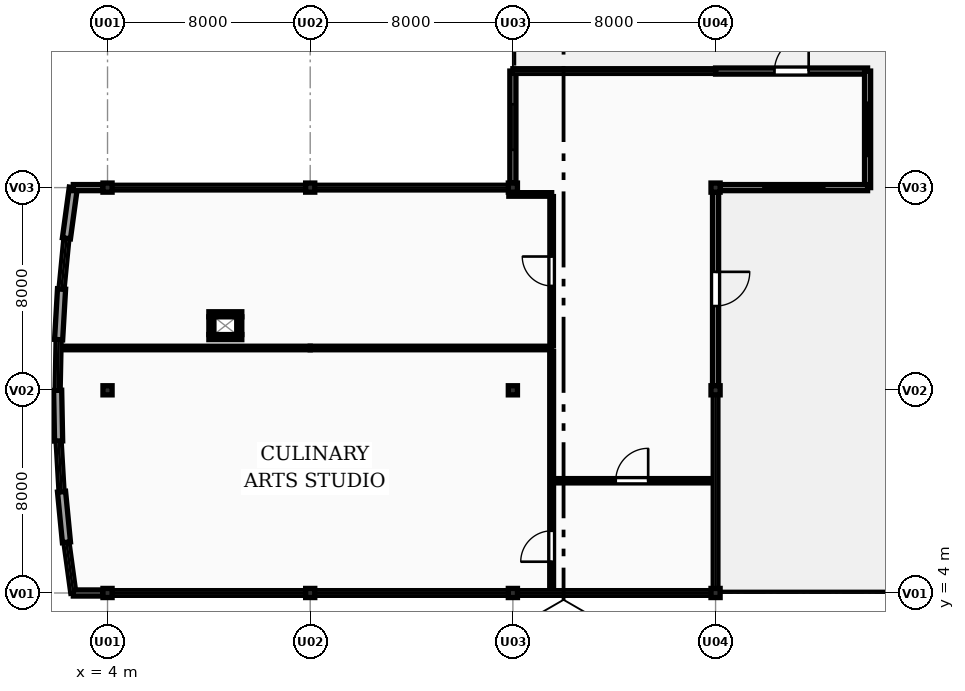
"""IFC4 building model, lengths in metres.
Left out: names, types, materials, properties, quantities, classifications, styles, units other than length and angle.
Written with IfcOpenShell. Run it as: python <this file> out.ifc"""

import sys

from ifc_helpers import new_model, si_unit, direction, frame, frame_2d, origin, origin_2d, place, context, subcontext, project, spatial, rectangle, extrude, element, fill, save


model = new_model("IFC4")
c1 = context("Model", 3, precision=1e-05, world=origin(), true_north=direction((0.0, 1.0)))
c2 = subcontext(c1, "Body", "Model", "MODEL_VIEW")
j1 = project(units=[si_unit("LENGTHUNIT", "METRE"), si_unit("PLANEANGLEUNIT", "RADIAN")], contexts=[c1])
p1 = place(None, origin())
s1 = spatial("IfcSite", under=j1, at=p1, CompositionType="ELEMENT")
p2 = place(p1, origin())
s2 = spatial("IfcBuilding", under=s1, at=p2, CompositionType="ELEMENT")
p3 = place(p2, frame((0.0, 0.0, 8.4)))
s3 = spatial("IfcBuildingStorey", under=s2, at=p3, CompositionType="ELEMENT", Elevation=8.4)
p4 = place(p3, frame((4.0, 4.0, 0.0), z_axis=(0.0, 0.0, 1.0), x_axis=(1.0, 0.0, 0.0)))
e1 = element("IfcColumn", 1, at=p4, inside=s3, PredefinedType="COLUMN", context=c2, shape_type="SweptSolid", body=[
    extrude(rectangle(XDim=0.36, YDim=0.36, at=origin_2d()), origin(), (0.0, 0.0, 1.0), 6.392),
])
p5 = place(p3, frame((4.0, 12.0, 0.0), z_axis=(0.0, 0.0, 1.0), x_axis=(1.0, 0.0, 0.0)))
e2 = element("IfcColumn", 2, at=p5, inside=s3, PredefinedType="COLUMN", context=c2, shape_type="SweptSolid", body=[
    extrude(rectangle(XDim=0.36, YDim=0.36, at=origin_2d()), origin(), (0.0, 0.0, 1.0), 4.462),
])
p6 = place(p3, frame((4.0, 20.0, 0.0), z_axis=(0.0, 0.0, 1.0), x_axis=(1.0, 0.0, 0.0)))
e3 = element("IfcColumn", 3, at=p6, inside=s3, PredefinedType="COLUMN", context=c2, shape_type="SweptSolid", body=[
    extrude(rectangle(XDim=0.36, YDim=0.36, at=origin_2d()), origin(), (0.0, 0.0, 1.0), 6.298),
])
p7 = place(p3, frame((12.0, 4.0, 0.0), z_axis=(0.0, 0.0, 1.0), x_axis=(1.0, 0.0, 0.0)))
e4 = element("IfcColumn", 4, at=p7, inside=s3, PredefinedType="COLUMN", context=c2, shape_type="SweptSolid", body=[
    extrude(rectangle(XDim=0.36, YDim=0.36, at=origin_2d()), origin(), (0.0, 0.0, 1.0), 6.225),
])
p8 = place(p3, frame((12.0, 20.0, 0.0), z_axis=(0.0, 0.0, 1.0), x_axis=(1.0, 0.0, 0.0)))
e5 = element("IfcColumn", 5, at=p8, inside=s3, PredefinedType="COLUMN", context=c2, shape_type="SweptSolid", body=[
    extrude(rectangle(XDim=0.36, YDim=0.36, at=origin_2d()), origin(), (0.0, 0.0, 1.0), 6.131),
])
p9 = place(p3, frame((20.0, 4.0, 0.0), z_axis=(0.0, 0.0, 1.0), x_axis=(1.0, 0.0, 0.0)))
e6 = element("IfcColumn", 6, at=p9, inside=s3, PredefinedType="COLUMN", context=c2, shape_type="SweptSolid", body=[
    extrude(rectangle(XDim=0.36, YDim=0.36, at=origin_2d()), origin(), (0.0, 0.0, 1.0), 6.057),
])
p10 = place(p3, frame((20.0, 12.0, 0.0), z_axis=(0.0, 0.0, 1.0), x_axis=(1.0, 0.0, 0.0)))
e7 = element("IfcColumn", 7, at=p10, inside=s3, PredefinedType="COLUMN", context=c2, shape_type="SweptSolid", body=[
    extrude(rectangle(XDim=0.36, YDim=0.36, at=origin_2d()), origin(), (0.0, 0.0, 1.0), 4.128),
])
p11 = place(p3, frame((20.0, 20.0, 0.0), z_axis=(0.0, 0.0, 1.0), x_axis=(1.0, 0.0, 0.0)))
e8 = element("IfcColumn", 8, at=p11, inside=s3, PredefinedType="COLUMN", context=c2, shape_type="SweptSolid", body=[
    extrude(rectangle(XDim=0.36, YDim=0.36, at=origin_2d()), origin(), (0.0, 0.0, 1.0), 5.963),
])
p12 = place(p3, frame((28.0, 4.0, 0.0), z_axis=(0.0, 0.0, 1.0), x_axis=(1.0, 0.0, 0.0)))
e9 = element("IfcColumn", 9, at=p12, inside=s3, PredefinedType="COLUMN", context=c2, shape_type="SweptSolid", body=[
    extrude(rectangle(XDim=0.36, YDim=0.36, at=origin_2d()), origin(), (0.0, 0.0, 1.0), 5.89),
])
p13 = place(p3, frame((28.0, 12.0, 0.0), z_axis=(0.0, 0.0, 1.0), x_axis=(1.0, 0.0, 0.0)))
e10 = element("IfcColumn", 10, at=p13, inside=s3, PredefinedType="COLUMN", context=c2, shape_type="SweptSolid", body=[
    extrude(rectangle(XDim=0.36, YDim=0.36, at=origin_2d()), origin(), (0.0, 0.0, 1.0), 3.961),
])
p14 = place(p3, frame((28.0, 20.0, 0.0), z_axis=(0.0, 0.0, 1.0), x_axis=(1.0, 0.0, 0.0)))
e11 = element("IfcColumn", 11, at=p14, inside=s3, PredefinedType="COLUMN", context=c2, shape_type="SweptSolid", body=[
    extrude(rectangle(XDim=0.36, YDim=0.36, at=origin_2d()), origin(), (0.0, 0.0, 1.0), 5.796),
])
p15 = place(p3, frame((2.65, 4.0, 0.0), z_axis=(0.0, 0.0, 1.0), x_axis=(-0.134627389588, 0.990896294257, 0.0)))
e12 = element("IfcWall", 12, at=p15, inside=s3, PredefinedType="SOLIDWALL", context=c2, shape_type="SweptSolid", body=[
    extrude(rectangle(XDim=2.018, YDim=0.2, at=frame_2d((1.009, 0.0))), origin(), (0.0, 0.0, 1.0), 0.95),
])
p16 = place(p3, frame((2.378, 6.0, 0.0), z_axis=(0.0, 0.0, 1.0), x_axis=(-0.096110619057, 0.995370659053, 0.0)))
e13 = element("IfcWall", 13, at=p16, inside=s3, PredefinedType="SOLIDWALL", context=c2, shape_type="SweptSolid", body=[
    extrude(rectangle(XDim=2.009, YDim=0.32, at=frame_2d((1.005, 0.0))), origin(), (0.0, 0.0, 1.0), 5.465),
])
p17 = place(p3, frame((2.185, 8.0, 0.0), z_axis=(0.0, 0.0, 1.0), x_axis=(-0.05776471272, 0.998330224908, 0.0)))
e14 = element("IfcWall", 14, at=p17, inside=s3, PredefinedType="SOLIDWALL", context=c2, shape_type="SweptSolid", body=[
    extrude(rectangle(XDim=2.003, YDim=0.2, at=frame_2d((1.002, 0.0))), origin(), (0.0, 0.0, 1.0), 0.95),
])
p18 = place(p3, frame((2.069, 10.0, 0.0), z_axis=(0.0, 0.0, 1.0), x_axis=(-0.019161520385, 0.999816401214, 0.0)))
e15 = element("IfcWall", 15, at=p18, inside=s3, PredefinedType="SOLIDWALL", context=c2, shape_type="SweptSolid", body=[
    extrude(rectangle(XDim=2.0, YDim=0.32, at=frame_2d((1.0, 0.0))), origin(), (0.0, 0.0, 1.0), 4.504),
])
p19 = place(p3, frame((2.031, 12.0, 0.0), z_axis=(0.0, 0.0, 1.0), x_axis=(0.019161520385, 0.999816401214, 0.0)))
e16 = element("IfcWall", 16, at=p19, inside=s3, PredefinedType="SOLIDWALL", context=c2, shape_type="SweptSolid", body=[
    extrude(rectangle(XDim=2.0, YDim=0.2, at=frame_2d((1.0, 0.0))), origin(), (0.0, 0.0, 1.0), 0.95),
])
p20 = place(p3, frame((2.069, 14.0, 0.0), z_axis=(0.0, 0.0, 1.0), x_axis=(0.05776471272, 0.998330224908, 0.0)))
e17 = element("IfcWall", 17, at=p20, inside=s3, PredefinedType="SOLIDWALL", context=c2, shape_type="SweptSolid", body=[
    extrude(rectangle(XDim=2.003, YDim=0.32, at=frame_2d((1.002, 0.0))), origin(), (0.0, 0.0, 1.0), 4.962),
])
p21 = place(p3, frame((2.185, 16.0, 0.0), z_axis=(0.0, 0.0, 1.0), x_axis=(0.096110619057, 0.995370659053, 0.0)))
e18 = element("IfcWall", 18, at=p21, inside=s3, PredefinedType="SOLIDWALL", context=c2, shape_type="SweptSolid", body=[
    extrude(rectangle(XDim=2.009, YDim=0.2, at=frame_2d((1.005, 0.0))), origin(), (0.0, 0.0, 1.0), 0.95),
])
p22 = place(p3, frame((2.378, 18.0, 0.0), z_axis=(0.0, 0.0, 1.0), x_axis=(0.134627389588, 0.990896294257, 0.0)))
e19 = element("IfcWall", 19, at=p22, inside=s3, PredefinedType="SOLIDWALL", context=c2, shape_type="SweptSolid", body=[
    extrude(rectangle(XDim=2.018, YDim=0.32, at=frame_2d((1.009, 0.0))), origin(), (0.0, 0.0, 1.0), 5.873),
])
for number, where, z_axis, x_axis in (
    (20, (27.82, 4.0, 0.0), (0.0, 0.0, 1.0), (-1.0, 0.0, 0.0)),
    (21, (19.82, 4.0, 0.0), (0.0, 0.0, 1.0), (-1.0, 0.0, 0.0)),
    (22, (11.82, 4.0, 0.0), (0.0, 0.0, 1.0), (-1.0, 0.0, 0.0)),
):
    element("IfcWall", number, at=place(p3, frame(where, z_axis=z_axis, x_axis=x_axis)), inside=s3, PredefinedType="SOLIDWALL", context=c2, shape_type="SweptSolid", body=[
        extrude(rectangle(XDim=7.64, YDim=0.185, at=frame_2d((3.82, 0.0))), origin(), (0.0, 0.0, 1.0), 0.95),
    ])
for number, where, z_axis, x_axis in (
    (23, (3.82, 4.0, 0.0), (0.0, 0.0, 1.0), (-1.0, 0.0, 0.0)),
    (24, (2.65, 20.0, 0.0), (0.0, 0.0, 1.0), (1.0, 0.0, 0.0)),
):
    element("IfcWall", number, at=place(p3, frame(where, z_axis=z_axis, x_axis=x_axis)), inside=s3, PredefinedType="SOLIDWALL", context=c2, shape_type="SweptSolid", body=[
        extrude(rectangle(XDim=1.17, YDim=0.24, at=frame_2d((0.585, 0.0))), origin(), (0.0, 0.0, 1.0), 3.09),
    ])
for number, where, z_axis, x_axis in (
    (25, (4.18, 20.0, 0.0), (0.0, 0.0, 1.0), (1.0, 0.0, 0.0)),
    (26, (12.18, 20.0, 0.0), (0.0, 0.0, 1.0), (1.0, 0.0, 0.0)),
):
    element("IfcWall", number, at=place(p3, frame(where, z_axis=z_axis, x_axis=x_axis)), inside=s3, PredefinedType="SOLIDWALL", context=c2, shape_type="SweptSolid", body=[
        extrude(rectangle(XDim=7.64, YDim=0.185, at=frame_2d((3.82, 0.0))), origin(), (0.0, 0.0, 1.0), 0.95),
    ])
p23 = place(p3, frame((20.0, 20.18, 0.0), z_axis=(0.0, 0.0, 1.0), x_axis=(0.0, 1.0, 0.0)))
e27 = element("IfcWall", 27, at=p23, inside=s3, PredefinedType="SOLIDWALL", context=c2, shape_type="SweptSolid", body=[
    extrude(rectangle(XDim=4.42, YDim=0.24, at=frame_2d((2.21, 0.0))), origin(), (0.0, 0.0, 1.0), 3.65),
])
p24 = place(p23, frame((1.31, 0.0, 0.95)))
e28 = element("IfcOpeningElement", 28, at=p24, cuts=e27, PredefinedType="OPENING", context=c2, shape_type="SweptSolid", body=[
    extrude(rectangle(XDim=1.8, YDim=1.35, at=frame_2d((0.9, 0.675))), frame((0.0, 0.13, 0.0), z_axis=(0.0, -1.0, 0.0), x_axis=(1.0, 0.0, 0.0)), (0.0, 0.0, 1.0), 0.26),
])
p25 = place(p3, frame((20.0, 24.6, 0.0), z_axis=(0.0, 0.0, 1.0), x_axis=(1.0, 0.0, 0.0)))
e29 = element("IfcWall", 29, at=p25, inside=s3, PredefinedType="SOLIDWALL", context=c2, shape_type="SweptSolid", body=[
    extrude(rectangle(XDim=8.0, YDim=0.185, at=frame_2d((4.0, 0.0))), origin(), (0.0, 0.0, 1.0), 0.95),
])
p26 = place(p3, frame((28.0, 24.6, 0.0), z_axis=(0.0, 0.0, 1.0), x_axis=(1.0, 0.0, 0.0)))
e30 = element("IfcWall", 30, at=p26, inside=s3, PredefinedType="SOLIDWALL", context=c2, shape_type="SweptSolid", body=[
    extrude(rectangle(XDim=6.0, YDim=0.24, at=frame_2d((3.0, 0.0))), origin(), (0.0, 0.0, 1.0), 3.65),
])
p27 = place(p26, frame((2.325, 0.0, 0.0)))
e31 = element("IfcOpeningElement", 31, at=p27, cuts=e30, PredefinedType="OPENING", context=c2, shape_type="SweptSolid", body=[
    extrude(rectangle(XDim=1.35, YDim=2.15, at=frame_2d((0.675, 1.075))), frame((0.0, 0.13, 0.0), z_axis=(0.0, -1.0, 0.0), x_axis=(1.0, 0.0, 0.0)), (0.0, 0.0, 1.0), 0.26),
])
p28 = place(p3, frame((34.0, 24.6, 0.0), z_axis=(0.0, 0.0, 1.0), x_axis=(0.0, -1.0, 0.0)))
e32 = element("IfcWall", 32, at=p28, inside=s3, PredefinedType="SOLIDWALL", context=c2, shape_type="SweptSolid", body=[
    extrude(rectangle(XDim=4.6, YDim=0.24, at=frame_2d((2.3, 0.0))), origin(), (0.0, 0.0, 1.0), 3.65),
])
p29 = place(p28, frame((1.25, 0.0, 0.95)))
e33 = element("IfcOpeningElement", 33, at=p29, cuts=e32, PredefinedType="OPENING", context=c2, shape_type="SweptSolid", body=[
    extrude(rectangle(XDim=2.1, YDim=1.35, at=frame_2d((1.05, 0.675))), frame((0.0, 0.13, 0.0), z_axis=(0.0, -1.0, 0.0), x_axis=(1.0, 0.0, 0.0)), (0.0, 0.0, 1.0), 0.26),
])
p30 = place(p3, frame((34.0, 20.0, 0.0), z_axis=(0.0, 0.0, 1.0), x_axis=(-1.0, 0.0, 0.0)))
e34 = element("IfcWall", 34, at=p30, inside=s3, PredefinedType="SOLIDWALL", context=c2, shape_type="SweptSolid", body=[
    extrude(rectangle(XDim=5.82, YDim=0.24, at=frame_2d((2.91, 0.0))), origin(), (0.0, 0.0, 1.0), 3.65),
])
p31 = place(p30, frame((1.71, 0.0, 0.95)))
e35 = element("IfcOpeningElement", 35, at=p31, cuts=e34, PredefinedType="OPENING", context=c2, shape_type="SweptSolid", body=[
    extrude(rectangle(XDim=2.4, YDim=1.35, at=frame_2d((1.2, 0.675))), frame((0.0, 0.13, 0.0), z_axis=(0.0, -1.0, 0.0), x_axis=(1.0, 0.0, 0.0)), (0.0, 0.0, 1.0), 0.26),
])
p32 = place(p3, frame((28.0, 19.82, 0.0), z_axis=(0.0, 0.0, 1.0), x_axis=(0.0, -1.0, 0.0)))
e36 = element("IfcWall", 36, at=p32, inside=s3, PredefinedType="SOLIDWALL", context=c2, shape_type="SweptSolid", body=[
    extrude(rectangle(XDim=7.64, YDim=0.24, at=frame_2d((3.82, 0.0))), origin(), (0.0, 0.0, 1.0), 3.412),
])
p33 = place(p32, frame((3.145, 0.0, 0.0)))
e37 = element("IfcOpeningElement", 37, at=p33, cuts=e36, PredefinedType="OPENING", context=c2, shape_type="SweptSolid", body=[
    extrude(rectangle(XDim=1.35, YDim=2.15, at=frame_2d((0.675, 1.075))), frame((0.0, 0.13, 0.0), z_axis=(0.0, -1.0, 0.0), x_axis=(1.0, 0.0, 0.0)), (0.0, 0.0, 1.0), 0.26),
])
p34 = place(p3, frame((28.0, 11.82, 0.0), z_axis=(0.0, 0.0, 1.0), x_axis=(0.0, -1.0, 0.0)))
e38 = element("IfcWall", 38, at=p34, inside=s3, PredefinedType="SOLIDWALL", context=c2, shape_type="SweptSolid", body=[
    extrude(rectangle(XDim=7.64, YDim=0.185, at=frame_2d((3.82, 0.0))), origin(), (0.0, 0.0, 1.0), 0.95),
])
for number, where, z_axis, x_axis in (
    (39, (9.3, 14.1, 0.0), (0.0, 0.0, 1.0), (-1.0, 0.0, 0.0)),
    (40, (8.0, 15.0, 0.0), (0.0, 0.0, 1.0), (1.0, 0.0, 0.0)),
):
    element("IfcWall", number, at=place(p3, frame(where, z_axis=z_axis, x_axis=x_axis)), inside=s3, PredefinedType="PARTITIONING", context=c2, shape_type="SweptSolid", body=[
        extrude(rectangle(XDim=1.3, YDim=0.2, at=frame_2d((0.65, 0.0))), origin(), (0.0, 0.0, 1.0), 3.65),
    ])
for number, where, z_axis, x_axis in (
    (41, (8.1, 14.2, 0.0), (0.0, 0.0, 1.0), (0.0, 1.0, 0.0)),
    (42, (9.2, 14.9, 0.0), (0.0, 0.0, 1.0), (0.0, -1.0, 0.0)),
):
    element("IfcWall", number, at=place(p3, frame(where, z_axis=z_axis, x_axis=x_axis)), inside=s3, PredefinedType="PARTITIONING", context=c2, shape_type="SweptSolid", body=[
        extrude(rectangle(XDim=0.7, YDim=0.2, at=frame_2d((0.35, 0.0))), origin(), (0.0, 0.0, 1.0), 3.65),
    ])
p35 = place(p3, frame((2.205, 13.67, 0.0), z_axis=(0.0, 0.0, 1.0), x_axis=(1.0, 0.0, 0.0)))
e43 = element("IfcWall", 43, at=p35, inside=s3, PredefinedType="PARTITIONING", context=c2, shape_type="SweptSolid", body=[
    extrude(rectangle(XDim=9.795, YDim=0.14, at=frame_2d((4.897, 0.0))), origin(), (0.0, 0.0, 1.0), 3.65),
])
p36 = place(p3, frame((12.0, 13.67, 0.0), z_axis=(0.0, 0.0, 1.0), x_axis=(1.0, 0.0, 0.0)))
e44 = element("IfcWall", 44, at=p36, inside=s3, PredefinedType="PARTITIONING", context=c2, shape_type="SweptSolid", body=[
    extrude(rectangle(XDim=9.53, YDim=0.14, at=frame_2d((4.765, 0.0))), origin(), (0.0, 0.0, 1.0), 3.65),
])
p37 = place(p3, frame((19.84, 19.73, 0.0), z_axis=(0.0, 0.0, 1.0), x_axis=(1.0, 0.0, 0.0)))
e45 = element("IfcWall", 45, at=p37, inside=s3, PredefinedType="PARTITIONING", context=c2, shape_type="SweptSolid", body=[
    extrude(rectangle(XDim=1.69, YDim=0.14, at=frame_2d((0.845, 0.0))), origin(), (0.0, 0.0, 1.0), 3.65),
])
p38 = place(p3, frame((21.53, 13.755, 0.0), z_axis=(0.0, 0.0, 1.0), x_axis=(0.0, 1.0, 0.0)))
e46 = element("IfcWall", 46, at=p38, inside=s3, PredefinedType="PARTITIONING", context=c2, shape_type="SweptSolid", body=[
    extrude(rectangle(XDim=5.89, YDim=0.14, at=frame_2d((2.945, 0.0))), origin(), (0.0, 0.0, 1.0), 3.65),
])
p39 = place(p38, frame((2.365, 0.0, 0.0)))
e47 = element("IfcOpeningElement", 47, at=p39, cuts=e46, PredefinedType="OPENING", context=c2, shape_type="SweptSolid", body=[
    extrude(rectangle(XDim=1.16, YDim=2.15, at=frame_2d((0.58, 1.075))), frame((0.0, 0.08, 0.0), z_axis=(0.0, -1.0, 0.0), x_axis=(1.0, 0.0, 0.0)), (0.0, 0.0, 1.0), 0.16),
])
p40 = place(p3, frame((21.53, 4.135, 0.0), z_axis=(0.0, 0.0, 1.0), x_axis=(0.0, 1.0, 0.0)))
e48 = element("IfcWall", 48, at=p40, inside=s3, PredefinedType="PARTITIONING", context=c2, shape_type="SweptSolid", body=[
    extrude(rectangle(XDim=9.396, YDim=0.15, at=frame_2d((4.698, 0.0))), origin(), (0.0, 0.0, 1.0), 3.65),
])
p41 = place(p40, frame((1.1, 0.0, 0.0)))
e49 = element("IfcOpeningElement", 49, at=p41, cuts=e48, PredefinedType="OPENING", context=c2, shape_type="SweptSolid", body=[
    extrude(rectangle(XDim=1.22, YDim=2.15, at=frame_2d((0.61, 1.075))), frame((0.0, 0.085, 0.0), z_axis=(0.0, -1.0, 0.0), x_axis=(1.0, 0.0, 0.0)), (0.0, 0.0, 1.0), 0.17),
])
p42 = place(p3, frame((21.67, 8.43, 0.0), z_axis=(0.0, 0.0, 1.0), x_axis=(1.0, 0.0, 0.0)))
e50 = element("IfcWall", 50, at=p42, inside=s3, PredefinedType="PARTITIONING", context=c2, shape_type="SweptSolid", body=[
    extrude(rectangle(XDim=6.196, YDim=0.17, at=frame_2d((3.098, 0.0))), origin(), (0.0, 0.0, 1.0), 3.65),
])
p43 = place(p42, frame((2.39, 0.0, 0.0)))
e51 = element("IfcOpeningElement", 51, at=p43, cuts=e50, PredefinedType="OPENING", context=c2, shape_type="SweptSolid", body=[
    extrude(rectangle(XDim=1.28, YDim=2.15, at=frame_2d((0.64, 1.075))), frame((0.0, 0.095, 0.0), z_axis=(0.0, -1.0, 0.0), x_axis=(1.0, 0.0, 0.0)), (0.0, 0.0, 1.0), 0.19),
])
p44 = place(p24, origin())
e52 = element("IfcWindow", 52, at=p44, inside=s3, PartitioningType="DOUBLE_PANEL_VERTICAL", PredefinedType="WINDOW", context=c2, shape_type="SweptSolid", body=[
    extrude(rectangle(XDim=1.8, YDim=1.35, at=frame_2d((0.9, 0.675))), frame((0.0, 0.03, 0.0), z_axis=(0.0, -1.0, 0.0), x_axis=(1.0, 0.0, 0.0)), (0.0, 0.0, 1.0), 0.06),
])
fill(e28, e52)
p45 = place(p27, origin())
e53 = element("IfcDoor", 53, at=p45, inside=s3, OperationType="SINGLE_SWING_RIGHT", PredefinedType="DOOR", context=c2, shape_type="SweptSolid", body=[
    extrude(rectangle(XDim=1.35, YDim=2.15, at=frame_2d((0.675, 1.075))), frame((0.0, 0.025, 0.0), z_axis=(0.0, -1.0, 0.0), x_axis=(1.0, 0.0, 0.0)), (0.0, 0.0, 1.0), 0.05),
])
fill(e31, e53)
p46 = place(p29, origin())
e54 = element("IfcWindow", 54, at=p46, inside=s3, PartitioningType="DOUBLE_PANEL_VERTICAL", PredefinedType="WINDOW", context=c2, shape_type="SweptSolid", body=[
    extrude(rectangle(XDim=2.1, YDim=1.35, at=frame_2d((1.05, 0.675))), frame((0.0, 0.03, 0.0), z_axis=(0.0, -1.0, 0.0), x_axis=(1.0, 0.0, 0.0)), (0.0, 0.0, 1.0), 0.06),
])
fill(e33, e54)
p47 = place(p31, origin())
e55 = element("IfcWindow", 55, at=p47, inside=s3, PartitioningType="DOUBLE_PANEL_VERTICAL", PredefinedType="WINDOW", context=c2, shape_type="SweptSolid", body=[
    extrude(rectangle(XDim=2.4, YDim=1.35, at=frame_2d((1.2, 0.675))), frame((0.0, 0.03, 0.0), z_axis=(0.0, -1.0, 0.0), x_axis=(1.0, 0.0, 0.0)), (0.0, 0.0, 1.0), 0.06),
])
fill(e35, e55)
p48 = place(p33, origin())
e56 = element("IfcDoor", 56, at=p48, inside=s3, OperationType="SINGLE_SWING_LEFT", PredefinedType="DOOR", context=c2, shape_type="SweptSolid", body=[
    extrude(rectangle(XDim=1.35, YDim=2.15, at=frame_2d((0.675, 1.075))), frame((0.0, 0.025, 0.0), z_axis=(0.0, -1.0, 0.0), x_axis=(1.0, 0.0, 0.0)), (0.0, 0.0, 1.0), 0.05),
])
fill(e37, e56)
p49 = place(p39, origin())
e57 = element("IfcDoor", 57, at=p49, inside=s3, OperationType="SINGLE_SWING_RIGHT", PredefinedType="DOOR", context=c2, shape_type="SweptSolid", body=[
    extrude(rectangle(XDim=1.16, YDim=2.15, at=frame_2d((0.58, 1.075))), frame((0.0, 0.025, 0.0), z_axis=(0.0, -1.0, 0.0), x_axis=(1.0, 0.0, 0.0)), (0.0, 0.0, 1.0), 0.05),
])
fill(e47, e57)
p50 = place(p41, origin())
e58 = element("IfcDoor", 58, at=p50, inside=s3, OperationType="SINGLE_SWING_LEFT", PredefinedType="DOOR", context=c2, shape_type="SweptSolid", body=[
    extrude(rectangle(XDim=1.22, YDim=2.15, at=frame_2d((0.61, 1.075))), frame((0.0, 0.025, 0.0), z_axis=(0.0, -1.0, 0.0), x_axis=(1.0, 0.0, 0.0)), (0.0, 0.0, 1.0), 0.05),
])
fill(e49, e58)
p51 = place(p43, origin())
e59 = element("IfcDoor", 59, at=p51, inside=s3, OperationType="SINGLE_SWING_RIGHT", PredefinedType="DOOR", context=c2, shape_type="SweptSolid", body=[
    extrude(rectangle(XDim=1.28, YDim=2.15, at=frame_2d((0.64, 1.075))), frame((0.0, 0.025, 0.0), z_axis=(0.0, -1.0, 0.0), x_axis=(1.0, 0.0, 0.0)), (0.0, 0.0, 1.0), 0.05),
])
fill(e51, e59)
save(model, sys.argv[1])
